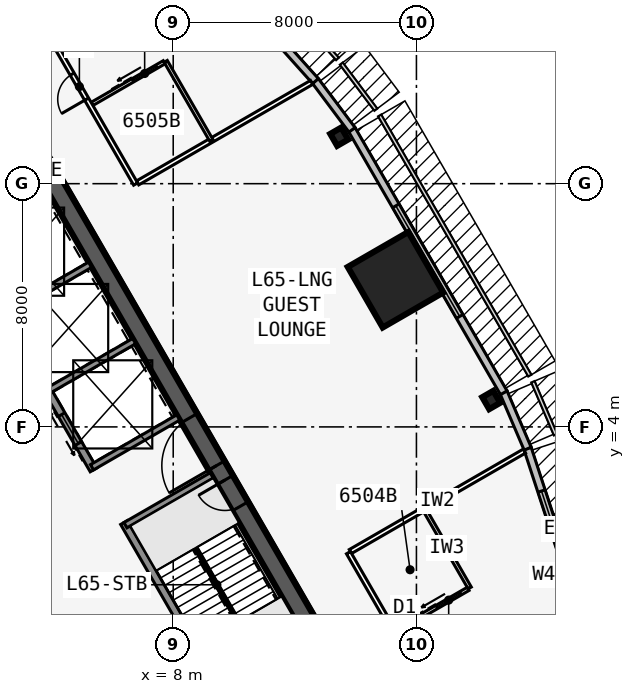
"""IFC4 building model, lengths in metres.
Left out: names, types, materials, properties, quantities, classifications, styles, units other than length and angle.
Written with IfcOpenShell. Run it as: python <this file> out.ifc"""

import sys

from ifc_helpers import new_model, si_unit, direction, frame, frame_2d, origin, origin_2d, place, context, subcontext, project, spatial, rectangle, i_section, extrude, element, fill, save


model = new_model("IFC4")
c1 = context("Model", 3, precision=1e-05, world=origin(), true_north=direction((0.0, 1.0)))
c2 = subcontext(c1, "Body", "Model", "MODEL_VIEW")
j1 = project(units=[si_unit("LENGTHUNIT", "METRE"), si_unit("PLANEANGLEUNIT", "RADIAN")], contexts=[c1])
p1 = place(None, origin())
s1 = spatial("IfcSite", under=j1, at=p1, CompositionType="ELEMENT")
p2 = place(p1, origin())
s2 = spatial("IfcBuilding", under=s1, at=p2, CompositionType="ELEMENT")
p3 = place(p2, frame((0.0, 0.0, 246.5)))
s3 = spatial("IfcBuildingStorey", under=s2, at=p3, CompositionType="ELEMENT", Elevation=246.5)
p4 = place(p3, frame((16.5, -9.526, 0.0), z_axis=(0.0, 0.0, 1.0), x_axis=(-0.499999749417, 0.866025548458, 0.0)))
e1 = element("IfcWall", 1, at=p4, inside=s3, PredefinedType="SHEAR", context=c2, shape_type="SweptSolid", body=[
    extrude(rectangle(XDim=33.0, YDim=0.6, at=frame_2d((16.5, 0.0))), origin(), (0.0, 0.0, 1.0), 3.6),
])
p5 = place(p4, frame((14.15, 0.0, 0.0)))
e2 = element("IfcOpeningElement", 2, at=p5, cuts=e1, PredefinedType="OPENING", context=c2, shape_type="SweptSolid", body=[
    extrude(rectangle(XDim=1.8, YDim=2.13, at=frame_2d((0.9, 1.065))), frame((0.0, 0.31, 0.0), z_axis=(0.0, -1.0, 0.0), x_axis=(1.0, 0.0, 0.0)), (0.0, 0.0, 1.0), 0.62),
])
p6 = place(p4, frame((12.6, 0.0, 0.0)))
e3 = element("IfcOpeningElement", 3, at=p6, cuts=e1, PredefinedType="OPENING", context=c2, shape_type="SweptSolid", body=[
    extrude(rectangle(XDim=1.0, YDim=2.13, at=frame_2d((0.5, 1.065))), frame((0.0, 0.31, 0.0), z_axis=(0.0, -1.0, 0.0), x_axis=(1.0, 0.0, 0.0)), (0.0, 0.0, 1.0), 0.62),
])
p7 = place(p3, frame((10.245, -5.843, 0.0), z_axis=(0.0, 0.0, 1.0), x_axis=(-0.499993009313, 0.866029439822, 0.0)))
e4 = element("IfcWall", 4, at=p7, inside=s3, PredefinedType="SOLIDWALL", context=c2, shape_type="SweptSolid", body=[
    extrude(rectangle(XDim=7.733, YDim=0.25, at=frame_2d((3.866, 0.0))), origin(), (0.0, 0.0, 1.0), 3.435),
])
p8 = place(p3, frame((5.379, 2.586, 0.0), z_axis=(0.0, 0.0, 1.0), x_axis=(-0.500001375892, 0.866024609411, 0.0)))
e5 = element("IfcWall", 5, at=p8, inside=s3, PredefinedType="SOLIDWALL", context=c2, shape_type="SweptSolid", body=[
    extrude(rectangle(XDim=10.633, YDim=0.25, at=frame_2d((5.316, 0.0))), origin(), (0.0, 0.0, 1.0), 3.435),
])
p9 = place(p8, frame((9.164, 0.0, 0.0)))
e6 = element("IfcOpeningElement", 6, at=p9, cuts=e5, PredefinedType="OPENING", context=c2, shape_type="SweptSolid", body=[
    extrude(rectangle(XDim=0.9, YDim=2.13, at=frame_2d((0.45, 1.065))), frame((0.0, 0.135, 0.0), z_axis=(0.0, -1.0, 0.0), x_axis=(1.0, 0.0, 0.0)), (0.0, 0.0, 1.0), 0.27),
])
p10 = place(p8, frame((1.0, 0.0, 0.0)))
e7 = element("IfcOpeningElement", 7, at=p10, cuts=e5, PredefinedType="OPENING", context=c2, shape_type="SweptSolid", body=[
    extrude(rectangle(XDim=1.1, YDim=2.13, at=frame_2d((0.55, 1.065))), frame((0.0, 0.135, 0.0), z_axis=(0.0, -1.0, 0.0), x_axis=(1.0, 0.0, 0.0)), (0.0, 0.0, 1.0), 0.27),
])
p11 = place(p8, frame((3.9, 0.0, 0.0)))
e8 = element("IfcOpeningElement", 8, at=p11, cuts=e5, PredefinedType="OPENING", context=c2, shape_type="SweptSolid", body=[
    extrude(rectangle(XDim=1.1, YDim=2.13, at=frame_2d((0.55, 1.065))), frame((0.0, 0.135, 0.0), z_axis=(0.0, -1.0, 0.0), x_axis=(1.0, 0.0, 0.0)), (0.0, 0.0, 1.0), 0.27),
])
p12 = place(p8, frame((6.8, 0.0, 0.0)))
e9 = element("IfcOpeningElement", 9, at=p12, cuts=e5, PredefinedType="OPENING", context=c2, shape_type="SweptSolid", body=[
    extrude(rectangle(XDim=1.1, YDim=2.13, at=frame_2d((0.55, 1.065))), frame((0.0, 0.135, 0.0), z_axis=(0.0, -1.0, 0.0), x_axis=(1.0, 0.0, 0.0)), (0.0, 0.0, 1.0), 0.27),
])
for number, where, z_axis, x_axis in (
    (10, (6.429, 0.767, 0.0), (0.0, 0.0, 1.0), (0.866, 0.5, 0.0)),
    (11, (5.329, 2.673, 0.0), (0.0, 0.0, 1.0), (0.866, 0.5, 0.0)),
    (12, (3.879, 5.184, 0.0), (0.0, 0.0, 1.0), (0.866, 0.5, 0.0)),
    (13, (2.429, 7.696, 0.0), (0.0, 0.0, 1.0), (0.866, 0.5, 0.0)),
):
    element("IfcWall", number, at=place(p3, frame(where, z_axis=z_axis, x_axis=x_axis)), inside=s3, PredefinedType="SOLIDWALL", context=c2, shape_type="SweptSolid", body=[
        extrude(rectangle(XDim=3.275, YDim=0.2, at=frame_2d((1.637, 0.0))), origin(), (0.0, 0.0, 1.0), 3.435),
    ])
for number, where, z_axis, x_axis in (
    (14, (18.461, 4.885, 0.0), (0.0, 0.0, 1.0), (0.866, 0.5, 0.0)),
    (15, (13.461, 13.545, 0.0), (0.0, 0.0, 1.0), (0.866, 0.5, 0.0)),
):
    element("IfcColumn", number, at=place(p3, frame(where, z_axis=z_axis, x_axis=x_axis)), inside=s3, PredefinedType="COLUMN", context=c2, shape_type="SweptSolid", body=[
        extrude(i_section(OverallWidth=0.419, OverallDepth=0.455, WebThickness=0.042, FlangeThickness=0.068, at=origin_2d()), origin(), (0.0, 0.0, 1.0), 3.6),
    ])
p13 = place(p3, frame((15.312, 8.84, 0.0), z_axis=(0.0, 0.0, 1.0), x_axis=(0.866025403784, 0.5, 0.0)))
e16 = element("IfcColumn", 16, at=p13, inside=s3, PredefinedType="COLUMN", context=c2, shape_type="SweptSolid", body=[
    extrude(rectangle(XDim=2.3, YDim=2.3, at=origin_2d()), origin(), (0.0, 0.0, 1.0), 3.6),
])
p14 = place(p3, frame((21.881, -3.503, 0.0), z_axis=(0.0, 0.0, 1.0), x_axis=(-0.311328857048, 0.95030223759, 0.0)))
e17 = element("IfcWall", 17, at=p14, inside=s3, PredefinedType="STANDARD", context=c2, shape_type="SweptSolid", body=[
    extrude(rectangle(XDim=7.153, YDim=0.25, at=frame_2d((3.576, 0.0))), origin(), (0.0, 0.0, 1.0), 3.435),
])
p15 = place(p14, frame((1.476, 0.0, 0.45)))
e18 = element("IfcOpeningElement", 18, at=p15, cuts=e17, PredefinedType="OPENING", context=c2, shape_type="SweptSolid", body=[
    extrude(rectangle(XDim=4.2, YDim=2.6, at=frame_2d((2.1, 1.3))), frame((0.0, 0.135, 0.0), z_axis=(0.0, -1.0, 0.0), x_axis=(1.0, 0.0, 0.0)), (0.0, 0.0, 1.0), 0.27),
])
p16 = place(p3, frame((19.658, 3.284, 0.0), z_axis=(0.0, 0.0, 1.0), x_axis=(-0.393290226175, 0.91941437774, 0.0)))
e19 = element("IfcWall", 19, at=p16, inside=s3, PredefinedType="STANDARD", context=c2, shape_type="SweptSolid", body=[
    extrude(rectangle(XDim=2.014, YDim=0.25, at=frame_2d((1.007, 0.0))), origin(), (0.0, 0.0, 1.0), 3.435),
])
p17 = place(p3, frame((18.873, 5.123, 0.0), z_axis=(0.0, 0.0, 1.0), x_axis=(-0.499993662806, 0.866029062534, 0.0)))
e20 = element("IfcWall", 20, at=p17, inside=s3, PredefinedType="STANDARD", context=c2, shape_type="SweptSolid", body=[
    extrude(rectangle(XDim=10.0, YDim=0.25, at=frame_2d((5.0, 0.0))), origin(), (0.0, 0.0, 1.0), 3.435),
])
p18 = place(p17, frame((2.9, 0.0, 0.45)))
e21 = element("IfcOpeningElement", 21, at=p18, cuts=e20, PredefinedType="OPENING", context=c2, shape_type="SweptSolid", body=[
    extrude(rectangle(XDim=4.2, YDim=2.6, at=frame_2d((2.1, 1.3))), frame((0.0, 0.135, 0.0), z_axis=(0.0, -1.0, 0.0), x_axis=(1.0, 0.0, 0.0)), (0.0, 0.0, 1.0), 0.27),
])
p19 = place(p3, frame((13.881, 13.771, 0.0), z_axis=(0.0, 0.0, 1.0), x_axis=(-0.599650843534, 0.800261748335, 0.0)))
e22 = element("IfcWall", 22, at=p19, inside=s3, PredefinedType="STANDARD", context=c2, shape_type="SweptSolid", body=[
    extrude(rectangle(XDim=2.014, YDim=0.25, at=frame_2d((1.007, 0.0))), origin(), (0.0, 0.0, 1.0), 3.435),
])
p20 = place(p3, frame((12.68, 15.374, 0.0), z_axis=(0.0, 0.0, 1.0), x_axis=(-0.667303550892, 0.744785855778, 0.0)))
e23 = element("IfcWall", 23, at=p20, inside=s3, PredefinedType="STANDARD", context=c2, shape_type="SweptSolid", body=[
    extrude(rectangle(XDim=7.153, YDim=0.25, at=frame_2d((3.576, 0.0))), origin(), (0.0, 0.0, 1.0), 3.435),
])
p21 = place(p20, frame((1.476, 0.0, 0.45)))
e24 = element("IfcOpeningElement", 24, at=p21, cuts=e23, PredefinedType="OPENING", context=c2, shape_type="SweptSolid", body=[
    extrude(rectangle(XDim=4.2, YDim=2.6, at=frame_2d((2.1, 1.3))), frame((0.0, 0.135, 0.0), z_axis=(0.0, -1.0, 0.0), x_axis=(1.0, 0.0, 0.0)), (0.0, 0.0, 1.0), 0.27),
])
p22 = place(p3, frame((20.177, -11.245, 0.0), z_axis=(0.0, 0.0, 1.0), x_axis=(-0.49999979161, 0.866025524098, 0.0)))
e25 = element("IfcWall", 25, at=p22, inside=s3, PredefinedType="PARTITIONING", context=c2, shape_type="SweptSolid", body=[
    extrude(rectangle(XDim=12.827, YDim=0.15, at=frame_2d((6.414, 0.0))), origin(), (0.0, 0.0, 1.0), 3.435),
])
p23 = place(p22, frame((8.652, 0.0, 0.0)))
e26 = element("IfcOpeningElement", 26, at=p23, cuts=e25, PredefinedType="OPENING", context=c2, shape_type="SweptSolid", body=[
    extrude(rectangle(XDim=0.95, YDim=2.13, at=frame_2d((0.475, 1.065))), frame((0.0, 0.085, 0.0), z_axis=(0.0, -1.0, 0.0), x_axis=(1.0, 0.0, 0.0)), (0.0, 0.0, 1.0), 0.17),
])
p24 = place(p3, frame((6.763, 11.988, 0.0), z_axis=(0.0, 0.0, 1.0), x_axis=(-0.499993758181, 0.86602900747, 0.0)))
e27 = element("IfcWall", 27, at=p24, inside=s3, PredefinedType="PARTITIONING", context=c2, shape_type="SweptSolid", body=[
    extrude(rectangle(XDim=12.827, YDim=0.15, at=frame_2d((6.414, 0.0))), origin(), (0.0, 0.0, 1.0), 3.435),
])
p25 = place(p24, frame((3.225, 0.0, 0.0)))
e28 = element("IfcOpeningElement", 28, at=p25, cuts=e27, PredefinedType="OPENING", context=c2, shape_type="SweptSolid", body=[
    extrude(rectangle(XDim=0.95, YDim=2.13, at=frame_2d((0.475, 1.065))), frame((0.0, 0.085, 0.0), z_axis=(0.0, -1.0, 0.0), x_axis=(1.0, 0.0, 0.0)), (0.0, 0.0, 1.0), 0.17),
])
p26 = place(p3, frame((13.829, -0.099, 0.0), z_axis=(0.0, 0.0, 1.0), x_axis=(0.866022562216, 0.500004921708, 0.0)))
e29 = element("IfcWall", 29, at=p26, inside=s3, PredefinedType="PARTITIONING", context=c2, shape_type="SweptSolid", body=[
    extrude(rectangle(XDim=6.609, YDim=0.15, at=frame_2d((3.304, 0.0))), origin(), (0.0, 0.0, 1.0), 2.678),
])
p27 = place(p3, frame((6.829, 12.025, 0.0), z_axis=(0.0, 0.0, 1.0), x_axis=(0.866029323189, 0.499993211332, 0.0)))
e30 = element("IfcWall", 30, at=p27, inside=s3, PredefinedType="PARTITIONING", context=c2, shape_type="SweptSolid", body=[
    extrude(rectangle(XDim=6.608, YDim=0.15, at=frame_2d((3.304, 0.0))), origin(), (0.0, 0.0, 1.0), 2.678),
])
p28 = place(p3, frame((17.753, -1.297, 0.0), z_axis=(0.0, 0.0, 1.0), x_axis=(-0.499990139034, 0.866031096941, 0.0)))
e31 = element("IfcWall", 31, at=p28, inside=s3, PredefinedType="PLUMBINGWALL", context=c2, shape_type="SweptSolid", body=[
    extrude(rectangle(XDim=3.0, YDim=0.12, at=frame_2d((1.5, 0.0))), origin(), (0.0, 0.0, 1.0), 3.435),
])
p29 = place(p3, frame((15.329, -2.697, 0.0), z_axis=(0.0, 0.0, 1.0), x_axis=(0.866035715982, 0.499982138324, 0.0)))
e32 = element("IfcWall", 32, at=p29, inside=s3, PredefinedType="PLUMBINGWALL", context=c2, shape_type="SweptSolid", body=[
    extrude(rectangle(XDim=2.74, YDim=0.12, at=frame_2d((1.37, 0.0))), origin(), (0.0, 0.0, 1.0), 3.435),
])
p30 = place(p29, frame((1.55, 0.0, 0.0)))
e33 = element("IfcOpeningElement", 33, at=p30, cuts=e32, PredefinedType="OPENING", context=c2, shape_type="SweptSolid", body=[
    extrude(rectangle(XDim=0.9, YDim=2.13, at=frame_2d((0.45, 1.065))), frame((0.0, 0.07, 0.0), z_axis=(0.0, -1.0, 0.0), x_axis=(1.0, 0.0, 0.0)), (0.0, 0.0, 1.0), 0.14),
])
p31 = place(p3, frame((9.253, 13.425, 0.0), z_axis=(0.0, 0.0, 1.0), x_axis=(-0.499990139034, 0.866031096941, 0.0)))
e34 = element("IfcWall", 34, at=p31, inside=s3, PredefinedType="PLUMBINGWALL", context=c2, shape_type="SweptSolid", body=[
    extrude(rectangle(XDim=3.0, YDim=0.12, at=frame_2d((1.5, 0.0))), origin(), (0.0, 0.0, 1.0), 3.435),
])
p32 = place(p3, frame((5.329, 14.623, 0.0), z_axis=(0.0, 0.0, 1.0), x_axis=(0.865997131366, 0.500048966069, 0.0)))
e35 = element("IfcWall", 35, at=p32, inside=s3, PredefinedType="PLUMBINGWALL", context=c2, shape_type="SweptSolid", body=[
    extrude(rectangle(XDim=2.74, YDim=0.12, at=frame_2d((1.37, 0.0))), origin(), (0.0, 0.0, 1.0), 3.435),
])
p33 = place(p32, frame((1.55, 0.0, 0.0)))
e36 = element("IfcOpeningElement", 36, at=p33, cuts=e35, PredefinedType="OPENING", context=c2, shape_type="SweptSolid", body=[
    extrude(rectangle(XDim=0.9, YDim=2.13, at=frame_2d((0.45, 1.065))), frame((0.0, 0.07, 0.0), z_axis=(0.0, -1.0, 0.0), x_axis=(1.0, 0.0, 0.0)), (0.0, 0.0, 1.0), 0.14),
])
p34 = place(p3, frame((10.135, -2.401, 0.0), z_axis=(0.0, 0.0, 1.0), x_axis=(-0.499992232847, 0.866029888106, 0.0)))
e37 = element("IfcWall", 37, at=p34, inside=s3, PredefinedType="SOLIDWALL", context=c2, shape_type="SweptSolid", body=[
    extrude(rectangle(XDim=2.794, YDim=0.1, at=frame_2d((1.397, 0.0))), origin(), (0.0, 0.0, 1.0), 3.6),
])
p35 = place(p15, origin())
e38 = element("IfcWindow", 38, at=p35, inside=s3, PartitioningType="SINGLE_PANEL", PredefinedType="WINDOW", context=c2, shape_type="SweptSolid", body=[
    extrude(rectangle(XDim=4.2, YDim=2.6, at=frame_2d((2.1, 1.3))), frame((0.0, 0.03, 0.0), z_axis=(0.0, -1.0, 0.0), x_axis=(1.0, 0.0, 0.0)), (0.0, 0.0, 1.0), 0.06),
])
fill(e18, e38)
p36 = place(p18, origin())
e39 = element("IfcWindow", 39, at=p36, inside=s3, PartitioningType="SINGLE_PANEL", PredefinedType="WINDOW", context=c2, shape_type="SweptSolid", body=[
    extrude(rectangle(XDim=4.2, YDim=2.6, at=frame_2d((2.1, 1.3))), frame((0.0, 0.03, 0.0), z_axis=(0.0, -1.0, 0.0), x_axis=(1.0, 0.0, 0.0)), (0.0, 0.0, 1.0), 0.06),
])
fill(e21, e39)
p37 = place(p30, origin())
e40 = element("IfcDoor", 40, at=p37, inside=s3, OperationType="SLIDING_TO_LEFT", PredefinedType="DOOR", context=c2, shape_type="SweptSolid", body=[
    extrude(rectangle(XDim=0.9, YDim=2.13, at=frame_2d((0.45, 1.065))), frame((0.0, 0.025, 0.0), z_axis=(0.0, -1.0, 0.0), x_axis=(1.0, 0.0, 0.0)), (0.0, 0.0, 1.0), 0.05),
])
fill(e33, e40)
p38 = place(p33, origin())
e41 = element("IfcDoor", 41, at=p38, inside=s3, OperationType="SLIDING_TO_LEFT", PredefinedType="DOOR", context=c2, shape_type="SweptSolid", body=[
    extrude(rectangle(XDim=0.9, YDim=2.13, at=frame_2d((0.45, 1.065))), frame((0.0, 0.025, 0.0), z_axis=(0.0, -1.0, 0.0), x_axis=(1.0, 0.0, 0.0)), (0.0, 0.0, 1.0), 0.05),
])
fill(e36, e41)
p39 = place(p25, origin())
e42 = element("IfcDoor", 42, at=p39, inside=s3, OperationType="SINGLE_SWING_LEFT", PredefinedType="DOOR", context=c2, shape_type="SweptSolid", body=[
    extrude(rectangle(XDim=0.95, YDim=2.13, at=frame_2d((0.475, 1.065))), frame((0.0, 0.025, 0.0), z_axis=(0.0, -1.0, 0.0), x_axis=(1.0, 0.0, 0.0)), (0.0, 0.0, 1.0), 0.05),
])
fill(e28, e42)
p40 = place(p5, origin())
e43 = element("IfcDoor", 43, at=p40, inside=s3, OperationType="DOUBLE_DOOR_SINGLE_SWING", PredefinedType="DOOR", context=c2, shape_type="SweptSolid", body=[
    extrude(rectangle(XDim=1.8, YDim=2.13, at=frame_2d((0.9, 1.065))), frame((0.0, 0.025, 0.0), z_axis=(0.0, -1.0, 0.0), x_axis=(1.0, 0.0, 0.0)), (0.0, 0.0, 1.0), 0.05),
])
fill(e2, e43)
p41 = place(p6, origin())
e44 = element("IfcDoor", 44, at=p41, inside=s3, OperationType="SINGLE_SWING_RIGHT", PredefinedType="DOOR", context=c2, shape_type="SweptSolid", body=[
    extrude(rectangle(XDim=1.0, YDim=2.13, at=frame_2d((0.5, 1.065))), frame((0.0, 0.025, 0.0), z_axis=(0.0, -1.0, 0.0), x_axis=(1.0, 0.0, 0.0)), (0.0, 0.0, 1.0), 0.05),
])
fill(e3, e44)
p42 = place(p10, origin())
e45 = element("IfcDoor", 45, at=p42, inside=s3, OperationType="DOUBLE_DOOR_SLIDING", PredefinedType="USERDEFINED", context=c2, shape_type="SweptSolid", body=[
    extrude(rectangle(XDim=1.1, YDim=2.13, at=frame_2d((0.55, 1.065))), frame((0.0, 0.025, 0.0), z_axis=(0.0, -1.0, 0.0), x_axis=(1.0, 0.0, 0.0)), (0.0, 0.0, 1.0), 0.05),
])
fill(e7, e45)
save(model, sys.argv[1])
